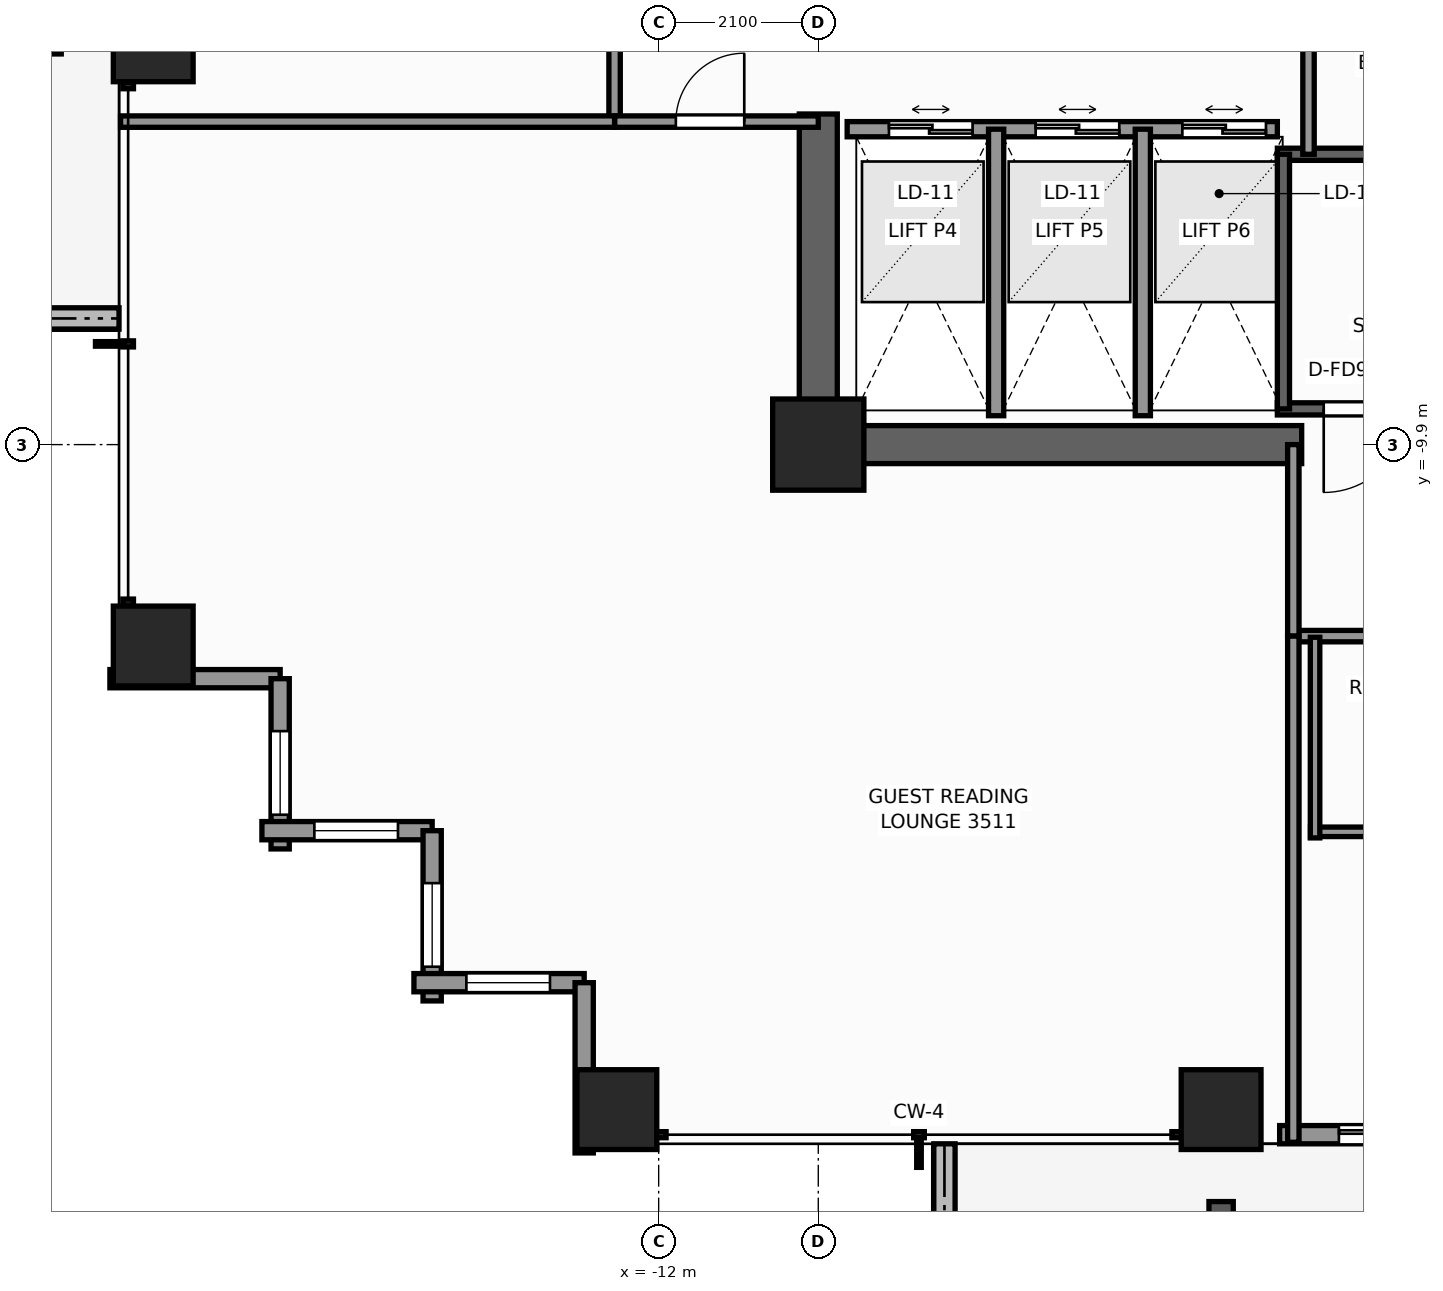
"""IFC4 building model, lengths in metres.
Left out: names, types, materials, properties, quantities, classifications, styles, units other than length and angle.
Written with IfcOpenShell. Run it as: python <this file> out.ifc"""

import sys

from ifc_helpers import new_model, si_unit, direction, frame, frame_2d, origin, origin_2d, place, context, subcontext, project, spatial, rectangle, extrude, element, fill, save


model = new_model("IFC4")
c1 = context("Model", 3, precision=1e-05, world=origin(), true_north=direction((0.0, 1.0)))
c2 = subcontext(c1, "Body", "Model", "MODEL_VIEW")
j1 = project(units=[si_unit("LENGTHUNIT", "METRE"), si_unit("PLANEANGLEUNIT", "RADIAN")], contexts=[c1])
p1 = place(None, origin())
s1 = spatial("IfcSite", under=j1, at=p1, CompositionType="ELEMENT")
p2 = place(p1, origin())
s2 = spatial("IfcBuilding", under=s1, at=p2, CompositionType="ELEMENT")
p3 = place(p2, frame((0.0, 0.0, 121.7)))
s3 = spatial("IfcBuildingStorey", under=s2, at=p3, CompositionType="ELEMENT", Elevation=121.7)
p4 = place(p3, frame((-3.54, -9.9, 0.0), z_axis=(0.0, 0.0, 1.0), x_axis=(-1.0, 0.0, 0.0)))
e1 = element("IfcWall", 1, at=p4, inside=s3, PredefinedType="SHEAR", context=c2, shape_type="SweptSolid", body=[
    extrude(rectangle(XDim=6.61, YDim=0.5, at=frame_2d((3.305, 0.0))), origin(), (0.0, 0.0, 1.0), 3.3),
])
p5 = place(p3, frame((-9.9, -9.65, 0.0), z_axis=(0.0, 0.0, 1.0), x_axis=(0.0, 1.0, 0.0)))
e2 = element("IfcWall", 2, at=p5, inside=s3, PredefinedType="SHEAR", context=c2, shape_type="SweptSolid", body=[
    extrude(rectangle(XDim=4.1, YDim=0.5, at=frame_2d((2.05, 0.0))), origin(), (0.0, 0.0, 1.0), 3.3),
])
p6 = place(p3, frame((-9.9, -9.9, 0.0), z_axis=(0.0, 0.0, 1.0), x_axis=(1.0, 0.0, 0.0)))
e3 = element("IfcColumn", 3, at=p6, inside=s3, PredefinedType="COLUMN", context=c2, shape_type="SweptSolid", body=[
    extrude(rectangle(XDim=1.2, YDim=1.2, at=origin_2d()), origin(), (0.0, 0.0, 1.0), 3.3),
])
for number, where, z_axis, x_axis in (
    (4, (-12.55, -18.65, 0.0), (0.0, 0.0, 1.0), (1.0, 0.0, 0.0)),
    (5, (-4.6, -18.65, 0.0), (0.0, 0.0, 1.0), (1.0, 0.0, 0.0)),
    (6, (-18.65, -12.55, 0.0), (0.0, 0.0, 1.0), (1.0, 0.0, 0.0)),
    (7, (-18.65, -4.6, 0.0), (0.0, 0.0, 1.0), (1.0, 0.0, 0.0)),
):
    element("IfcColumn", number, at=place(p3, frame(where, z_axis=z_axis, x_axis=x_axis)), inside=s3, PredefinedType="COLUMN", context=c2, shape_type="SweptSolid", body=[
        extrude(rectangle(XDim=1.05, YDim=1.05, at=origin_2d()), origin(), (0.0, 0.0, 1.0), 3.3),
    ])
p7 = place(p3, frame((-8.24, -19.1, -0.04), z_axis=(0.0, 0.0, 1.0), x_axis=(0.0, -1.0, 0.0)))
e8 = element("IfcWall", 8, at=p7, inside=s3, PredefinedType="PARAPET", context=c2, shape_type="SweptSolid", body=[
    extrude(rectangle(XDim=3.3, YDim=0.28, at=frame_2d((1.65, 0.0))), origin(), (0.0, 0.0, 1.0), 0.42),
])
p8 = place(p3, frame((-20.36, -8.24, -0.04), z_axis=(0.0, 0.0, 1.0), x_axis=(1.0, 0.0, 0.0)))
e9 = element("IfcWall", 9, at=p8, inside=s3, PredefinedType="PARAPET", context=c2, shape_type="SweptSolid", body=[
    extrude(rectangle(XDim=1.26, YDim=0.28, at=frame_2d((0.63, 0.0))), origin(), (0.0, 0.0, 1.0), 0.42),
])
p9 = place(p3, frame((-0.47, -18.98, 0.0), z_axis=(0.0, 0.0, 1.0), x_axis=(-1.0, 0.0, 0.0)))
e10 = element("IfcWall", 10, at=p9, inside=s3, PredefinedType="STANDARD", context=c2, shape_type="SweptSolid", body=[
    extrude(rectangle(XDim=3.36, YDim=0.24, at=frame_2d((1.68, 0.0))), origin(), (0.0, 0.0, 1.0), 3.08),
])
p10 = place(p9, frame((0.78, 0.0, 0.0)))
e11 = element("IfcOpeningElement", 11, at=p10, cuts=e10, PredefinedType="OPENING", context=c2, shape_type="SweptSolid", body=[
    extrude(rectangle(XDim=1.8, YDim=2.2, at=frame_2d((0.9, 1.1))), frame((0.0, 0.13, 0.0), z_axis=(0.0, -1.0, 0.0), x_axis=(1.0, 0.0, 0.0)), (0.0, 0.0, 1.0), 0.26),
])
p11 = place(p3, frame((-16.98, -12.98, 0.0), z_axis=(0.0, 0.0, 1.0), x_axis=(-1.0, 0.0, 0.0)))
e12 = element("IfcWall", 12, at=p11, inside=s3, PredefinedType="STANDARD", context=c2, shape_type="SweptSolid", body=[
    extrude(rectangle(XDim=2.24, YDim=0.24, at=frame_2d((1.12, 0.0))), origin(), (0.0, 0.0, 1.0), 2.459),
])
p12 = place(p3, frame((-16.98, -15.22, 0.0), z_axis=(0.0, 0.0, 1.0), x_axis=(0.0, 1.0, 0.0)))
e13 = element("IfcWall", 13, at=p12, inside=s3, PredefinedType="STANDARD", context=c2, shape_type="SweptSolid", body=[
    extrude(rectangle(XDim=2.24, YDim=0.24, at=frame_2d((1.12, 0.0))), origin(), (0.0, 0.0, 1.0), 2.459),
])
p13 = place(p12, frame((0.45, 0.0, 0.65)))
e14 = element("IfcOpeningElement", 14, at=p13, cuts=e13, PredefinedType="OPENING", context=c2, shape_type="SweptSolid", body=[
    extrude(rectangle(XDim=1.1, YDim=1.45, at=frame_2d((0.55, 0.725))), frame((0.0, 0.13, 0.0), z_axis=(0.0, -1.0, 0.0), x_axis=(1.0, 0.0, 0.0)), (0.0, 0.0, 1.0), 0.26),
])
p14 = place(p3, frame((-14.98, -14.98, 0.0), z_axis=(0.0, 0.0, 1.0), x_axis=(-1.0, 0.0, 0.0)))
e15 = element("IfcWall", 15, at=p14, inside=s3, PredefinedType="STANDARD", context=c2, shape_type="SweptSolid", body=[
    extrude(rectangle(XDim=2.24, YDim=0.24, at=frame_2d((1.12, 0.0))), origin(), (0.0, 0.0, 1.0), 2.459),
])
p15 = place(p14, frame((0.45, 0.0, 0.65)))
e16 = element("IfcOpeningElement", 16, at=p15, cuts=e15, PredefinedType="OPENING", context=c2, shape_type="SweptSolid", body=[
    extrude(rectangle(XDim=1.1, YDim=1.45, at=frame_2d((0.55, 0.725))), frame((0.0, 0.13, 0.0), z_axis=(0.0, -1.0, 0.0), x_axis=(1.0, 0.0, 0.0)), (0.0, 0.0, 1.0), 0.26),
])
p16 = place(p3, frame((-14.98, -17.22, 0.0), z_axis=(0.0, 0.0, 1.0), x_axis=(0.0, 1.0, 0.0)))
e17 = element("IfcWall", 17, at=p16, inside=s3, PredefinedType="STANDARD", context=c2, shape_type="SweptSolid", body=[
    extrude(rectangle(XDim=2.24, YDim=0.24, at=frame_2d((1.12, 0.0))), origin(), (0.0, 0.0, 1.0), 2.459),
])
p17 = place(p16, frame((0.45, 0.0, 0.65)))
e18 = element("IfcOpeningElement", 18, at=p17, cuts=e17, PredefinedType="OPENING", context=c2, shape_type="SweptSolid", body=[
    extrude(rectangle(XDim=1.1, YDim=1.45, at=frame_2d((0.55, 0.725))), frame((0.0, 0.13, 0.0), z_axis=(0.0, -1.0, 0.0), x_axis=(1.0, 0.0, 0.0)), (0.0, 0.0, 1.0), 0.26),
])
p18 = place(p3, frame((-12.98, -16.98, 0.0), z_axis=(0.0, 0.0, 1.0), x_axis=(-1.0, 0.0, 0.0)))
e19 = element("IfcWall", 19, at=p18, inside=s3, PredefinedType="STANDARD", context=c2, shape_type="SweptSolid", body=[
    extrude(rectangle(XDim=2.24, YDim=0.24, at=frame_2d((1.12, 0.0))), origin(), (0.0, 0.0, 1.0), 2.459),
])
p19 = place(p18, frame((0.45, 0.0, 0.65)))
e20 = element("IfcOpeningElement", 20, at=p19, cuts=e19, PredefinedType="OPENING", context=c2, shape_type="SweptSolid", body=[
    extrude(rectangle(XDim=1.1, YDim=1.45, at=frame_2d((0.55, 0.725))), frame((0.0, 0.13, 0.0), z_axis=(0.0, -1.0, 0.0), x_axis=(1.0, 0.0, 0.0)), (0.0, 0.0, 1.0), 0.26),
])
p20 = place(p3, frame((-12.98, -19.22, 0.0), z_axis=(0.0, 0.0, 1.0), x_axis=(0.0, 1.0, 0.0)))
e21 = element("IfcWall", 21, at=p20, inside=s3, PredefinedType="STANDARD", context=c2, shape_type="SweptSolid", body=[
    extrude(rectangle(XDim=2.24, YDim=0.24, at=frame_2d((1.12, 0.0))), origin(), (0.0, 0.0, 1.0), 2.459),
])
p21 = place(p3, frame((3.86, -9.43, 0.0), z_axis=(0.0, 0.0, 1.0), x_axis=(-1.0, 0.0, 0.0)))
e22 = element("IfcWall", 22, at=p21, inside=s3, PredefinedType="SHEAR", context=c2, shape_type="SweptSolid", body=[
    extrude(rectangle(XDim=7.72, YDim=0.16, at=frame_2d((3.86, 0.0))), origin(), (0.0, 0.0, 1.0), 3.3),
])
p22 = place(p21, frame((6.01, 0.0, 0.0)))
e23 = element("IfcOpeningElement", 23, at=p22, cuts=e22, PredefinedType="OPENING", context=c2, shape_type="SweptSolid", body=[
    extrude(rectangle(XDim=1.1, YDim=2.2, at=frame_2d((0.55, 1.1))), frame((0.0, 0.09, 0.0), z_axis=(0.0, -1.0, 0.0), x_axis=(1.0, 0.0, 0.0)), (0.0, 0.0, 1.0), 0.18),
])
p23 = place(p3, frame((-3.86, -6.08, 0.0), z_axis=(0.0, 0.0, 1.0), x_axis=(1.0, 0.0, 0.0)))
e24 = element("IfcWall", 24, at=p23, inside=s3, PredefinedType="SHEAR", context=c2, shape_type="SweptSolid", body=[
    extrude(rectangle(XDim=7.72, YDim=0.16, at=frame_2d((3.86, 0.0))), origin(), (0.0, 0.0, 1.0), 3.3),
])
p24 = place(p3, frame((-3.78, -9.43, 0.0), z_axis=(0.0, 0.0, 1.0), x_axis=(0.0, 1.0, 0.0)))
e25 = element("IfcWall", 25, at=p24, inside=s3, PredefinedType="SHEAR", context=c2, shape_type="SweptSolid", body=[
    extrude(rectangle(XDim=3.35, YDim=0.16, at=frame_2d((1.675, 0.0))), origin(), (0.0, 0.0, 1.0), 3.3),
])
p25 = place(p3, frame((-9.52, -5.75, 0.0), z_axis=(0.0, 0.0, 1.0), x_axis=(1.0, 0.0, 0.0)))
e26 = element("IfcWall", 26, at=p25, inside=s3, PredefinedType="SOLIDWALL", context=c2, shape_type="SweptSolid", body=[
    extrude(rectangle(XDim=5.66, YDim=0.2, at=frame_2d((2.83, 0.0))), origin(), (0.0, 0.0, 1.0), 3.08),
])
p26 = place(p25, frame((0.55, 0.0, 0.0)))
e27 = element("IfcOpeningElement", 27, at=p26, cuts=e26, PredefinedType="OPENING", context=c2, shape_type="SweptSolid", body=[
    extrude(rectangle(XDim=1.1, YDim=2.2, at=frame_2d((0.55, 1.1))), frame((0.0, 0.11, 0.0), z_axis=(0.0, -1.0, 0.0), x_axis=(1.0, 0.0, 0.0)), (0.0, 0.0, 1.0), 0.22),
])
p27 = place(p25, frame((2.48, 0.0, 0.0)))
e28 = element("IfcOpeningElement", 28, at=p27, cuts=e26, PredefinedType="OPENING", context=c2, shape_type="SweptSolid", body=[
    extrude(rectangle(XDim=1.1, YDim=2.2, at=frame_2d((0.55, 1.1))), frame((0.0, 0.11, 0.0), z_axis=(0.0, -1.0, 0.0), x_axis=(1.0, 0.0, 0.0)), (0.0, 0.0, 1.0), 0.22),
])
p28 = place(p25, frame((4.41, 0.0, 0.0)))
e29 = element("IfcOpeningElement", 29, at=p28, cuts=e26, PredefinedType="OPENING", context=c2, shape_type="SweptSolid", body=[
    extrude(rectangle(XDim=1.1, YDim=2.2, at=frame_2d((0.55, 1.1))), frame((0.0, 0.11, 0.0), z_axis=(0.0, -1.0, 0.0), x_axis=(1.0, 0.0, 0.0)), (0.0, 0.0, 1.0), 0.22),
])
for number, where, z_axis, x_axis in (
    (30, (-7.56, -9.52, 0.0), (0.0, 0.0, 1.0), (0.0, 1.0, 0.0)),
    (31, (-5.63, -9.52, 0.0), (0.0, 0.0, 1.0), (0.0, 1.0, 0.0)),
):
    element("IfcWall", number, at=place(p3, frame(where, z_axis=z_axis, x_axis=x_axis)), inside=s3, PredefinedType="SOLIDWALL", context=c2, shape_type="SweptSolid", body=[
        extrude(rectangle(XDim=3.77, YDim=0.2, at=frame_2d((1.885, 0.0))), origin(), (0.0, 0.0, 1.0), 3.08),
    ])
p29 = place(p3, frame((-3.45, -6.08, 0.0), z_axis=(0.0, 0.0, 1.0), x_axis=(0.0, 1.0, 0.0)))
e32 = element("IfcWall", 32, at=p29, inside=s3, PredefinedType="PARTITIONING", context=c2, shape_type="SweptSolid", body=[
    extrude(rectangle(XDim=2.36, YDim=0.15, at=frame_2d((1.18, 0.0))), origin(), (0.0, 0.0, 1.0), 3.08),
])
p30 = place(p3, frame((-3.65, -12.42, 0.0), z_axis=(0.0, 0.0, 1.0), x_axis=(1.0, 0.0, 0.0)))
e33 = element("IfcWall", 33, at=p30, inside=s3, PredefinedType="PARTITIONING", context=c2, shape_type="SweptSolid", body=[
    extrude(rectangle(XDim=15.91, YDim=0.15, at=frame_2d((7.955, 0.0))), origin(), (0.0, 0.0, 1.0), 2.292),
])
p31 = place(p30, frame((5.205, 0.0, 0.0)))
e34 = element("IfcOpeningElement", 34, at=p31, cuts=e33, PredefinedType="OPENING", context=c2, shape_type="SweptSolid", body=[
    extrude(rectangle(XDim=0.95, YDim=2.06, at=frame_2d((0.475, 1.03))), frame((0.0, 0.085, 0.0), z_axis=(0.0, -1.0, 0.0), x_axis=(1.0, 0.0, 0.0)), (0.0, 0.0, 1.0), 0.17),
])
p32 = place(p30, frame((12.052, 0.0, 0.0)))
e35 = element("IfcOpeningElement", 35, at=p32, cuts=e33, PredefinedType="OPENING", context=c2, shape_type="SweptSolid", body=[
    extrude(rectangle(XDim=0.95, YDim=2.06, at=frame_2d((0.475, 1.03))), frame((0.0, 0.085, 0.0), z_axis=(0.0, -1.0, 0.0), x_axis=(1.0, 0.0, 0.0)), (0.0, 0.0, 1.0), 0.17),
])
p33 = place(p3, frame((-3.65, -12.42, 0.0), z_axis=(0.0, 0.0, 1.0), x_axis=(0.0, 1.0, 0.0)))
e36 = element("IfcWall", 36, at=p33, inside=s3, PredefinedType="PARTITIONING", context=c2, shape_type="SweptSolid", body=[
    extrude(rectangle(XDim=2.52, YDim=0.15, at=frame_2d((1.26, 0.0))), origin(), (0.0, 0.0, 1.0), 3.08),
])
p34 = place(p3, frame((-12.58, -5.65, 0.0), z_axis=(0.0, 0.0, 1.0), x_axis=(0.0, 1.0, 0.0)))
e37 = element("IfcWall", 37, at=p34, inside=s3, PredefinedType="PARTITIONING", context=c2, shape_type="SweptSolid", body=[
    extrude(rectangle(XDim=3.6, YDim=0.15, at=frame_2d((1.8, 0.0))), origin(), (0.0, 0.0, 1.0), 2.292),
])
p35 = place(p34, frame((2.156, 0.0, 0.0)))
e38 = element("IfcOpeningElement", 38, at=p35, cuts=e37, PredefinedType="OPENING", context=c2, shape_type="SweptSolid", body=[
    extrude(rectangle(XDim=0.9, YDim=2.06, at=frame_2d((0.45, 1.03))), frame((0.0, 0.085, 0.0), z_axis=(0.0, -1.0, 0.0), x_axis=(1.0, 0.0, 0.0)), (0.0, 0.0, 1.0), 0.17),
])
p36 = place(p3, frame((-12.58, -5.65, 0.0), z_axis=(0.0, 0.0, 1.0), x_axis=(1.0, 0.0, 0.0)))
e39 = element("IfcWall", 39, at=p36, inside=s3, PredefinedType="PARTITIONING", context=c2, shape_type="SweptSolid", body=[
    extrude(rectangle(XDim=2.68, YDim=0.15, at=frame_2d((1.34, 0.0))), origin(), (0.0, 0.0, 1.0), 3.08),
])
p37 = place(p36, frame((0.806, 0.0, 0.0)))
e40 = element("IfcOpeningElement", 40, at=p37, cuts=e39, PredefinedType="OPENING", context=c2, shape_type="SweptSolid", body=[
    extrude(rectangle(XDim=0.9, YDim=2.06, at=frame_2d((0.45, 1.03))), frame((0.0, 0.085, 0.0), z_axis=(0.0, -1.0, 0.0), x_axis=(1.0, 0.0, 0.0)), (0.0, 0.0, 1.0), 0.17),
])
p38 = place(p3, frame((-19.08, -5.65, 0.0), z_axis=(0.0, 0.0, 1.0), x_axis=(1.0, 0.0, 0.0)))
e41 = element("IfcWall", 41, at=p38, inside=s3, PredefinedType="PARTITIONING", context=c2, shape_type="SweptSolid", body=[
    extrude(rectangle(XDim=6.5, YDim=0.15, at=frame_2d((3.25, 0.0))), origin(), (0.0, 0.0, 1.0), 2.449),
])
p39 = place(p3, frame((-3.65, -19.08, 0.0), z_axis=(0.0, 0.0, 1.0), x_axis=(0.0, 1.0, 0.0)))
e42 = element("IfcWall", 42, at=p39, inside=s3, PredefinedType="PARTITIONING", context=c2, shape_type="SweptSolid", body=[
    extrude(rectangle(XDim=6.66, YDim=0.15, at=frame_2d((3.33, 0.0))), origin(), (0.0, 0.0, 1.0), 2.449),
])
p40 = place(p3, frame((-3.424, -14.995, 0.0), z_axis=(0.0, 0.0, 1.0), x_axis=(1.0, 0.0, 0.0)))
e43 = element("IfcWall", 43, at=p40, inside=s3, PredefinedType="PARTITIONING", context=c2, shape_type="SweptSolid", body=[
    extrude(rectangle(XDim=2.52, YDim=0.125, at=frame_2d((1.26, 0.0))), origin(), (0.0, 0.0, 1.0), 3.08),
])
p41 = place(p3, frame((-3.364, -15.075, 0.0), z_axis=(0.0, 0.0, 1.0), x_axis=(0.0, 1.0, 0.0)))
e44 = element("IfcWall", 44, at=p41, inside=s3, PredefinedType="PARTITIONING", context=c2, shape_type="SweptSolid", body=[
    extrude(rectangle(XDim=2.64, YDim=0.125, at=frame_2d((1.32, 0.0))), origin(), (0.0, 0.0, 1.0), 3.08),
])
p42 = place(p10, origin())
e45 = element("IfcDoor", 45, at=p42, inside=s3, OperationType="DOUBLE_DOOR_SLIDING", PredefinedType="DOOR", context=c2, shape_type="SweptSolid", body=[
    extrude(rectangle(XDim=1.8, YDim=2.2, at=frame_2d((0.9, 1.1))), frame((0.0, 0.025, 0.0), z_axis=(0.0, -1.0, 0.0), x_axis=(1.0, 0.0, 0.0)), (0.0, 0.0, 1.0), 0.05),
])
fill(e11, e45)
p43 = place(p13, origin())
e46 = element("IfcWindow", 46, at=p43, inside=s3, PartitioningType="SINGLE_PANEL", PredefinedType="WINDOW", context=c2, shape_type="SweptSolid", body=[
    extrude(rectangle(XDim=1.1, YDim=1.45, at=frame_2d((0.55, 0.725))), frame((0.0, 0.03, 0.0), z_axis=(0.0, -1.0, 0.0), x_axis=(1.0, 0.0, 0.0)), (0.0, 0.0, 1.0), 0.06),
])
fill(e14, e46)
p44 = place(p15, origin())
e47 = element("IfcWindow", 47, at=p44, inside=s3, PartitioningType="SINGLE_PANEL", PredefinedType="WINDOW", context=c2, shape_type="SweptSolid", body=[
    extrude(rectangle(XDim=1.1, YDim=1.45, at=frame_2d((0.55, 0.725))), frame((0.0, 0.03, 0.0), z_axis=(0.0, -1.0, 0.0), x_axis=(1.0, 0.0, 0.0)), (0.0, 0.0, 1.0), 0.06),
])
fill(e16, e47)
p45 = place(p17, origin())
e48 = element("IfcWindow", 48, at=p45, inside=s3, PartitioningType="SINGLE_PANEL", PredefinedType="WINDOW", context=c2, shape_type="SweptSolid", body=[
    extrude(rectangle(XDim=1.1, YDim=1.45, at=frame_2d((0.55, 0.725))), frame((0.0, 0.03, 0.0), z_axis=(0.0, -1.0, 0.0), x_axis=(1.0, 0.0, 0.0)), (0.0, 0.0, 1.0), 0.06),
])
fill(e18, e48)
p46 = place(p19, origin())
e49 = element("IfcWindow", 49, at=p46, inside=s3, PartitioningType="SINGLE_PANEL", PredefinedType="WINDOW", context=c2, shape_type="SweptSolid", body=[
    extrude(rectangle(XDim=1.1, YDim=1.45, at=frame_2d((0.55, 0.725))), frame((0.0, 0.03, 0.0), z_axis=(0.0, -1.0, 0.0), x_axis=(1.0, 0.0, 0.0)), (0.0, 0.0, 1.0), 0.06),
])
fill(e20, e49)
p47 = place(p22, origin())
e50 = element("IfcDoor", 50, at=p47, inside=s3, OperationType="SINGLE_SWING_RIGHT", PredefinedType="DOOR", context=c2, shape_type="SweptSolid", body=[
    extrude(rectangle(XDim=1.1, YDim=2.2, at=frame_2d((0.55, 1.1))), frame((0.0, 0.025, 0.0), z_axis=(0.0, -1.0, 0.0), x_axis=(1.0, 0.0, 0.0)), (0.0, 0.0, 1.0), 0.05),
])
fill(e23, e50)
p48 = place(p26, origin())
e51 = element("IfcDoor", 51, at=p48, inside=s3, OperationType="DOUBLE_DOOR_SLIDING", PredefinedType="DOOR", context=c2, shape_type="SweptSolid", body=[
    extrude(rectangle(XDim=1.1, YDim=2.2, at=frame_2d((0.55, 1.1))), frame((0.0, 0.025, 0.0), z_axis=(0.0, -1.0, 0.0), x_axis=(1.0, 0.0, 0.0)), (0.0, 0.0, 1.0), 0.05),
])
fill(e27, e51)
p49 = place(p27, origin())
e52 = element("IfcDoor", 52, at=p49, inside=s3, OperationType="DOUBLE_DOOR_SLIDING", PredefinedType="DOOR", context=c2, shape_type="SweptSolid", body=[
    extrude(rectangle(XDim=1.1, YDim=2.2, at=frame_2d((0.55, 1.1))), frame((0.0, 0.025, 0.0), z_axis=(0.0, -1.0, 0.0), x_axis=(1.0, 0.0, 0.0)), (0.0, 0.0, 1.0), 0.05),
])
fill(e28, e52)
p50 = place(p28, origin())
e53 = element("IfcDoor", 53, at=p50, inside=s3, OperationType="DOUBLE_DOOR_SLIDING", PredefinedType="DOOR", context=c2, shape_type="SweptSolid", body=[
    extrude(rectangle(XDim=1.1, YDim=2.2, at=frame_2d((0.55, 1.1))), frame((0.0, 0.025, 0.0), z_axis=(0.0, -1.0, 0.0), x_axis=(1.0, 0.0, 0.0)), (0.0, 0.0, 1.0), 0.05),
])
fill(e29, e53)
p51 = place(p37, origin())
e54 = element("IfcDoor", 54, at=p51, inside=s3, OperationType="SINGLE_SWING_RIGHT", PredefinedType="DOOR", context=c2, shape_type="SweptSolid", body=[
    extrude(rectangle(XDim=0.9, YDim=2.06, at=frame_2d((0.45, 1.03))), frame((0.0, 0.025, 0.0), z_axis=(0.0, -1.0, 0.0), x_axis=(1.0, 0.0, 0.0)), (0.0, 0.0, 1.0), 0.05),
])
fill(e40, e54)
save(model, sys.argv[1])
